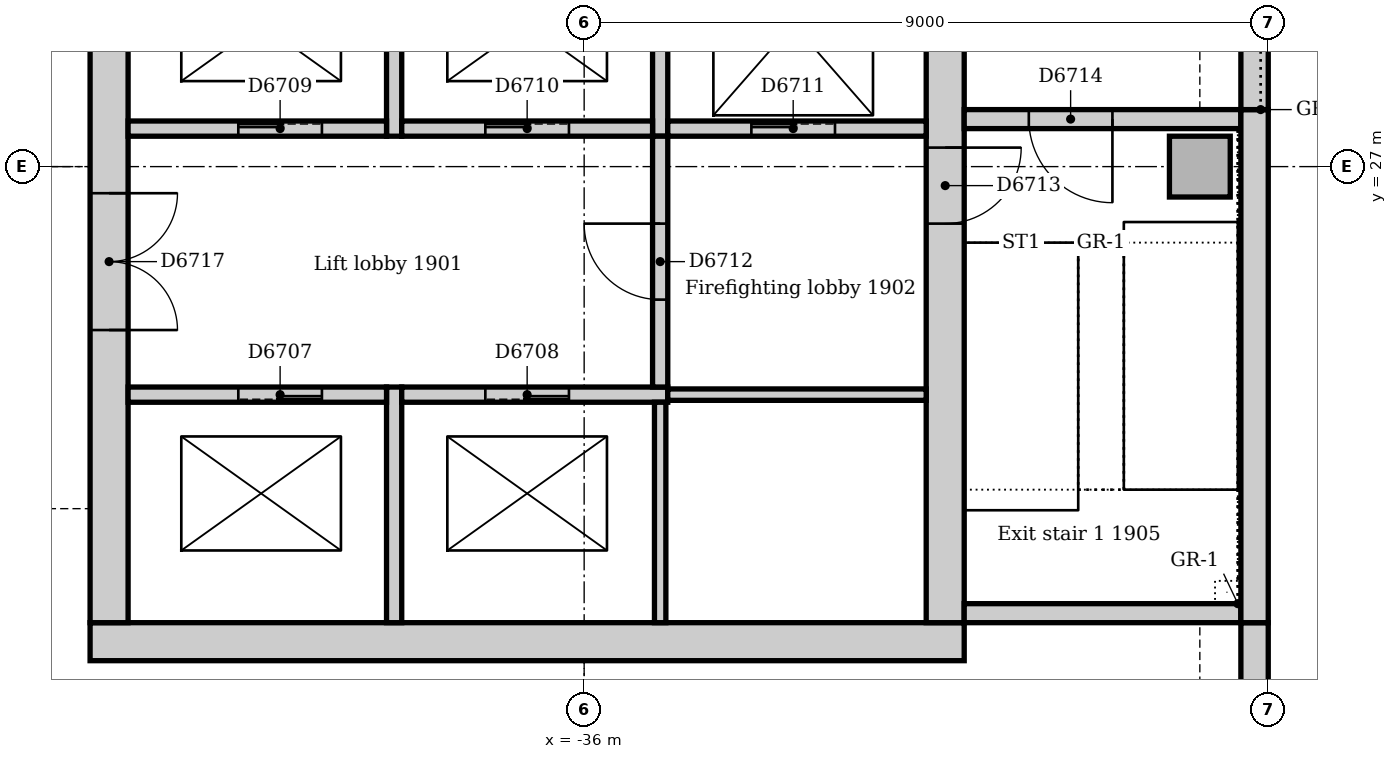
"""IFC4 building model, lengths in metres.
Left out: names, types, materials, properties, quantities, classifications, styles, units other than length and angle.
Written with IfcOpenShell. Run it as: python <this file> out.ifc"""

import sys

from ifc_helpers import new_model, si_unit, direction, frame, frame_2d, origin, origin_2d, place, context, subcontext, project, spatial, rectangle, extrude, element, fill, save


model = new_model("IFC4")
c1 = context("Model", 3, precision=1e-05, world=origin(), true_north=direction((0.0, 1.0)))
c2 = subcontext(c1, "Body", "Model", "MODEL_VIEW")
j1 = project(units=[si_unit("LENGTHUNIT", "METRE"), si_unit("PLANEANGLEUNIT", "RADIAN")], contexts=[c1])
p1 = place(None, origin())
s1 = spatial("IfcSite", under=j1, at=p1, CompositionType="ELEMENT")
p2 = place(p1, origin())
s2 = spatial("IfcBuilding", under=s1, at=p2, CompositionType="ELEMENT")
p3 = place(p2, frame((0.0, 0.0, 83.0)))
s3 = spatial("IfcBuildingStorey", under=s2, at=p3, CompositionType="ELEMENT", Elevation=83.0)
p4 = place(p3, frame((-42.5, 20.75, 0.0), z_axis=(0.0, 0.0, 1.0), x_axis=(1.0, 0.0, 0.0)))
e1 = element("IfcWall", 1, at=p4, inside=s3, PredefinedType="SOLIDWALL", context=c2, shape_type="SweptSolid", body=[
    extrude(rectangle(XDim=11.5, YDim=0.5, at=frame_2d((5.75, 0.0))), origin(), (0.0, 0.0, 1.0), 4.0),
])
p5 = place(p3, frame((-31.25, 21.0, 0.0), z_axis=(0.0, 0.0, 1.0), x_axis=(0.0, 1.0, 0.0)))
e2 = element("IfcWall", 2, at=p5, inside=s3, PredefinedType="SOLIDWALL", context=c2, shape_type="SweptSolid", body=[
    extrude(rectangle(XDim=9.5, YDim=0.5, at=frame_2d((4.75, 0.0))), origin(), (0.0, 0.0, 1.0), 4.0),
])
p6 = place(p5, frame((5.25, 0.0, 0.0)))
e3 = element("IfcOpeningElement", 3, at=p6, cuts=e2, PredefinedType="OPENING", context=c2, shape_type="SweptSolid", body=[
    extrude(rectangle(XDim=1.0, YDim=2.1, at=frame_2d((0.5, 1.05))), frame((0.0, 0.26, 0.0), z_axis=(0.0, -1.0, 0.0), x_axis=(1.0, 0.0, 0.0)), (0.0, 0.0, 1.0), 0.52),
])
p7 = place(p3, frame((-42.25, 30.5, 0.0), z_axis=(0.0, 0.0, 1.0), x_axis=(0.0, -1.0, 0.0)))
e4 = element("IfcWall", 4, at=p7, inside=s3, PredefinedType="SOLIDWALL", context=c2, shape_type="SweptSolid", body=[
    extrude(rectangle(XDim=9.5, YDim=0.5, at=frame_2d((4.75, 0.0))), origin(), (0.0, 0.0, 1.0), 4.0),
])
p8 = place(p7, frame((3.85, 0.0, 0.0)))
e5 = element("IfcOpeningElement", 5, at=p8, cuts=e4, PredefinedType="OPENING", context=c2, shape_type="SweptSolid", body=[
    extrude(rectangle(XDim=1.8, YDim=2.1, at=frame_2d((0.9, 1.05))), frame((0.0, 0.26, 0.0), z_axis=(0.0, -1.0, 0.0), x_axis=(1.0, 0.0, 0.0)), (0.0, 0.0, 1.0), 0.52),
])
p9 = place(p3, frame((-31.0, 21.125, 0.0), z_axis=(0.0, 0.0, 1.0), x_axis=(1.0, 0.0, 0.0)))
e6 = element("IfcWall", 6, at=p9, inside=s3, PredefinedType="SOLIDWALL", context=c2, shape_type="SweptSolid", body=[
    extrude(rectangle(XDim=3.64, YDim=0.25, at=frame_2d((1.82, 0.0))), origin(), (0.0, 0.0, 1.0), 4.0),
])
p10 = place(p3, frame((-27.36, 27.625, 0.0), z_axis=(0.0, 0.0, 1.0), x_axis=(-1.0, 0.0, 0.0)))
e7 = element("IfcWall", 7, at=p10, inside=s3, PredefinedType="SOLIDWALL", context=c2, shape_type="SweptSolid", body=[
    extrude(rectangle(XDim=3.64, YDim=0.25, at=frame_2d((1.82, 0.0))), origin(), (0.0, 0.0, 1.0), 4.0),
])
p11 = place(p10, frame((1.69, 0.0, 0.0)))
e8 = element("IfcOpeningElement", 8, at=p11, cuts=e7, PredefinedType="OPENING", context=c2, shape_type="SweptSolid", body=[
    extrude(rectangle(XDim=1.1, YDim=2.1, at=frame_2d((0.55, 1.05))), frame((0.0, 0.135, 0.0), z_axis=(0.0, -1.0, 0.0), x_axis=(1.0, 0.0, 0.0)), (0.0, 0.0, 1.0), 0.27),
])
p12 = place(p3, frame((-27.9, 27.0, 0.0), z_axis=(0.0, 0.0, 1.0), x_axis=(1.0, 0.0, 0.0)))
e9 = element("IfcColumn", 9, at=p12, inside=s3, PredefinedType="COLUMN", context=c2, shape_type="SweptSolid", body=[
    extrude(rectangle(XDim=0.8, YDim=0.8, at=origin_2d()), origin(), (0.0, 0.0, 1.0), 4.0),
])
p13 = place(p3, frame((-27.18, 13.243, 0.0), z_axis=(0.0, 0.0, 1.0), x_axis=(0.0, 1.0, 0.0)))
e10 = element("IfcWall", 10, at=p13, inside=s3, PredefinedType="STANDARD", context=c2, shape_type="SweptSolid", body=[
    extrude(rectangle(XDim=7.757, YDim=0.36, at=frame_2d((3.879, 0.0))), origin(), (0.0, 0.0, 1.0), 3.85),
])
p14 = place(p13, frame((1.982, 0.0, 0.9)))
e11 = element("IfcOpeningElement", 11, at=p14, cuts=e10, PredefinedType="OPENING", context=c2, shape_type="SweptSolid", body=[
    extrude(rectangle(XDim=3.3, YDim=1.6, at=frame_2d((1.65, 0.8))), frame((0.0, 0.19, 0.0), z_axis=(0.0, -1.0, 0.0), x_axis=(1.0, 0.0, 0.0)), (0.0, 0.0, 1.0), 0.38),
])
p15 = place(p3, frame((-27.18, 21.0, 0.0), z_axis=(0.0, 0.0, 1.0), x_axis=(0.0, 1.0, 0.0)))
e12 = element("IfcWall", 12, at=p15, inside=s3, PredefinedType="STANDARD", context=c2, shape_type="SweptSolid", body=[
    extrude(rectangle(XDim=6.75, YDim=0.36, at=frame_2d((3.375, 0.0))), origin(), (0.0, 0.0, 1.0), 3.85),
])
p16 = place(p3, frame((-27.18, 27.75, 0.0), z_axis=(0.0, 0.0, 1.0), x_axis=(0.0, 1.0, 0.0)))
e13 = element("IfcWall", 13, at=p16, inside=s3, PredefinedType="STANDARD", context=c2, shape_type="SweptSolid", body=[
    extrude(rectangle(XDim=7.5, YDim=0.36, at=frame_2d((3.75, 0.0))), origin(), (0.0, 0.0, 1.0), 3.85),
])
p17 = place(p16, frame((2.85, 0.0, 1.2)))
e14 = element("IfcOpeningElement", 14, at=p17, cuts=e13, PredefinedType="OPENING", context=c2, shape_type="SweptSolid", body=[
    extrude(rectangle(XDim=1.8, YDim=1.2, at=frame_2d((0.9, 0.6))), frame((0.0, 0.19, 0.0), z_axis=(0.0, -1.0, 0.0), x_axis=(1.0, 0.0, 0.0)), (0.0, 0.0, 1.0), 0.38),
])
p18 = place(p3, frame((-38.5, 21.0, 0.0), z_axis=(0.0, 0.0, 1.0), x_axis=(0.0, 1.0, 0.0)))
e15 = element("IfcWall", 15, at=p18, inside=s3, PredefinedType="SOLIDWALL", context=c2, shape_type="SweptSolid", body=[
    extrude(rectangle(XDim=3.1, YDim=0.2, at=frame_2d((1.55, 0.0))), origin(), (0.0, 0.0, 1.0), 4.0),
])
p19 = place(p3, frame((-38.6, 24.0, 0.0), z_axis=(0.0, 0.0, 1.0), x_axis=(-1.0, 0.0, 0.0)))
e16 = element("IfcWall", 16, at=p19, inside=s3, PredefinedType="SOLIDWALL", context=c2, shape_type="SweptSolid", body=[
    extrude(rectangle(XDim=3.4, YDim=0.2, at=frame_2d((1.7, 0.0))), origin(), (0.0, 0.0, 1.0), 4.0),
])
p20 = place(p19, frame((0.85, 0.0, 0.0)))
e17 = element("IfcOpeningElement", 17, at=p20, cuts=e16, PredefinedType="OPENING", context=c2, shape_type="SweptSolid", body=[
    extrude(rectangle(XDim=1.1, YDim=2.1, at=frame_2d((0.55, 1.05))), frame((0.0, 0.11, 0.0), z_axis=(0.0, -1.0, 0.0), x_axis=(1.0, 0.0, 0.0)), (0.0, 0.0, 1.0), 0.22),
])
p21 = place(p3, frame((-34.9, 24.0, 0.0), z_axis=(0.0, 0.0, 1.0), x_axis=(-1.0, 0.0, 0.0)))
e18 = element("IfcWall", 18, at=p21, inside=s3, PredefinedType="SOLIDWALL", context=c2, shape_type="SweptSolid", body=[
    extrude(rectangle(XDim=3.5, YDim=0.2, at=frame_2d((1.75, 0.0))), origin(), (0.0, 0.0, 1.0), 4.0),
])
p22 = place(p21, frame((1.3, 0.0, 0.0)))
e19 = element("IfcOpeningElement", 19, at=p22, cuts=e18, PredefinedType="OPENING", context=c2, shape_type="SweptSolid", body=[
    extrude(rectangle(XDim=1.1, YDim=2.1, at=frame_2d((0.55, 1.05))), frame((0.0, 0.11, 0.0), z_axis=(0.0, -1.0, 0.0), x_axis=(1.0, 0.0, 0.0)), (0.0, 0.0, 1.0), 0.22),
])
p23 = place(p3, frame((-38.5, 27.4, 0.0), z_axis=(0.0, 0.0, 1.0), x_axis=(0.0, 1.0, 0.0)))
e20 = element("IfcWall", 20, at=p23, inside=s3, PredefinedType="SOLIDWALL", context=c2, shape_type="SweptSolid", body=[
    extrude(rectangle(XDim=2.85, YDim=0.2, at=frame_2d((1.425, 0.0))), origin(), (0.0, 0.0, 1.0), 4.0),
])
p24 = place(p3, frame((-42.0, 27.5, 0.0), z_axis=(0.0, 0.0, 1.0), x_axis=(1.0, 0.0, 0.0)))
e21 = element("IfcWall", 21, at=p24, inside=s3, PredefinedType="SOLIDWALL", context=c2, shape_type="SweptSolid", body=[
    extrude(rectangle(XDim=3.4, YDim=0.2, at=frame_2d((1.7, 0.0))), origin(), (0.0, 0.0, 1.0), 4.0),
])
p25 = place(p24, frame((1.45, 0.0, 0.0)))
e22 = element("IfcOpeningElement", 22, at=p25, cuts=e21, PredefinedType="OPENING", context=c2, shape_type="SweptSolid", body=[
    extrude(rectangle(XDim=1.1, YDim=2.1, at=frame_2d((0.55, 1.05))), frame((0.0, 0.11, 0.0), z_axis=(0.0, -1.0, 0.0), x_axis=(1.0, 0.0, 0.0)), (0.0, 0.0, 1.0), 0.22),
])
p26 = place(p3, frame((-35.0, 27.4, 0.0), z_axis=(0.0, 0.0, 1.0), x_axis=(0.0, 1.0, 0.0)))
e23 = element("IfcWall", 23, at=p26, inside=s3, PredefinedType="SOLIDWALL", context=c2, shape_type="SweptSolid", body=[
    extrude(rectangle(XDim=2.85, YDim=0.2, at=frame_2d((1.425, 0.0))), origin(), (0.0, 0.0, 1.0), 4.0),
])
p27 = place(p3, frame((-38.4, 27.5, 0.0), z_axis=(0.0, 0.0, 1.0), x_axis=(1.0, 0.0, 0.0)))
e24 = element("IfcWall", 24, at=p27, inside=s3, PredefinedType="SOLIDWALL", context=c2, shape_type="SweptSolid", body=[
    extrude(rectangle(XDim=3.3, YDim=0.2, at=frame_2d((1.65, 0.0))), origin(), (0.0, 0.0, 1.0), 4.0),
])
p28 = place(p27, frame((1.1, 0.0, 0.0)))
e25 = element("IfcOpeningElement", 25, at=p28, cuts=e24, PredefinedType="OPENING", context=c2, shape_type="SweptSolid", body=[
    extrude(rectangle(XDim=1.1, YDim=2.1, at=frame_2d((0.55, 1.05))), frame((0.0, 0.11, 0.0), z_axis=(0.0, -1.0, 0.0), x_axis=(1.0, 0.0, 0.0)), (0.0, 0.0, 1.0), 0.22),
])
p29 = place(p3, frame((-34.9, 27.5, 0.0), z_axis=(0.0, 0.0, 1.0), x_axis=(1.0, 0.0, 0.0)))
e26 = element("IfcWall", 26, at=p29, inside=s3, PredefinedType="SOLIDWALL", context=c2, shape_type="SweptSolid", body=[
    extrude(rectangle(XDim=3.4, YDim=0.2, at=frame_2d((1.7, 0.0))), origin(), (0.0, 0.0, 1.0), 4.0),
])
p30 = place(p29, frame((1.1, 0.0, 0.0)))
e27 = element("IfcOpeningElement", 27, at=p30, cuts=e26, PredefinedType="OPENING", context=c2, shape_type="SweptSolid", body=[
    extrude(rectangle(XDim=1.1, YDim=2.1, at=frame_2d((0.55, 1.05))), frame((0.0, 0.11, 0.0), z_axis=(0.0, -1.0, 0.0), x_axis=(1.0, 0.0, 0.0)), (0.0, 0.0, 1.0), 0.22),
])
p31 = place(p3, frame((-35.0, 24.1, 0.0), z_axis=(0.0, 0.0, 1.0), x_axis=(0.0, 1.0, 0.0)))
e28 = element("IfcWall", 28, at=p31, inside=s3, PredefinedType="SOLIDWALL", context=c2, shape_type="SweptSolid", body=[
    extrude(rectangle(XDim=3.3, YDim=0.2, at=frame_2d((1.65, 0.0))), origin(), (0.0, 0.0, 1.0), 4.0),
])
p32 = place(p31, frame((1.15, 0.0, 0.0)))
e29 = element("IfcOpeningElement", 29, at=p32, cuts=e28, PredefinedType="OPENING", context=c2, shape_type="SweptSolid", body=[
    extrude(rectangle(XDim=1.0, YDim=2.1, at=frame_2d((0.5, 1.05))), frame((0.0, 0.11, 0.0), z_axis=(0.0, -1.0, 0.0), x_axis=(1.0, 0.0, 0.0)), (0.0, 0.0, 1.0), 0.22),
])
p33 = place(p3, frame((-35.0, 21.0, 0.0), z_axis=(0.0, 0.0, 1.0), x_axis=(0.0, 1.0, 0.0)))
e30 = element("IfcWall", 30, at=p33, inside=s3, PredefinedType="SOLIDWALL", context=c2, shape_type="SweptSolid", body=[
    extrude(rectangle(XDim=2.9, YDim=0.15, at=frame_2d((1.45, 0.0))), origin(), (0.0, 0.0, 1.0), 4.0),
])
p34 = place(p3, frame((-31.5, 24.0, 0.0), z_axis=(0.0, 0.0, 1.0), x_axis=(-1.0, 0.0, 0.0)))
e31 = element("IfcWall", 31, at=p34, inside=s3, PredefinedType="SOLIDWALL", context=c2, shape_type="SweptSolid", body=[
    extrude(rectangle(XDim=3.4, YDim=0.15, at=frame_2d((1.7, 0.0))), origin(), (0.0, 0.0, 1.0), 4.0),
])
p35 = place(p20, origin())
e32 = element("IfcDoor", 32, at=p35, inside=s3, OperationType="SLIDING_TO_LEFT", PredefinedType="DOOR", context=c2, shape_type="SweptSolid", body=[
    extrude(rectangle(XDim=1.1, YDim=2.1, at=frame_2d((0.55, 1.05))), frame((0.0, 0.025, 0.0), z_axis=(0.0, -1.0, 0.0), x_axis=(1.0, 0.0, 0.0)), (0.0, 0.0, 1.0), 0.05),
])
fill(e17, e32)
p36 = place(p22, origin())
e33 = element("IfcDoor", 33, at=p36, inside=s3, OperationType="SLIDING_TO_LEFT", PredefinedType="DOOR", context=c2, shape_type="SweptSolid", body=[
    extrude(rectangle(XDim=1.1, YDim=2.1, at=frame_2d((0.55, 1.05))), frame((0.0, 0.025, 0.0), z_axis=(0.0, -1.0, 0.0), x_axis=(1.0, 0.0, 0.0)), (0.0, 0.0, 1.0), 0.05),
])
fill(e19, e33)
p37 = place(p25, origin())
e34 = element("IfcDoor", 34, at=p37, inside=s3, OperationType="SLIDING_TO_LEFT", PredefinedType="DOOR", context=c2, shape_type="SweptSolid", body=[
    extrude(rectangle(XDim=1.1, YDim=2.1, at=frame_2d((0.55, 1.05))), frame((0.0, 0.025, 0.0), z_axis=(0.0, -1.0, 0.0), x_axis=(1.0, 0.0, 0.0)), (0.0, 0.0, 1.0), 0.05),
])
fill(e22, e34)
p38 = place(p28, origin())
e35 = element("IfcDoor", 35, at=p38, inside=s3, OperationType="SLIDING_TO_LEFT", PredefinedType="DOOR", context=c2, shape_type="SweptSolid", body=[
    extrude(rectangle(XDim=1.1, YDim=2.1, at=frame_2d((0.55, 1.05))), frame((0.0, 0.025, 0.0), z_axis=(0.0, -1.0, 0.0), x_axis=(1.0, 0.0, 0.0)), (0.0, 0.0, 1.0), 0.05),
])
fill(e25, e35)
p39 = place(p30, origin())
e36 = element("IfcDoor", 36, at=p39, inside=s3, OperationType="SLIDING_TO_LEFT", PredefinedType="DOOR", context=c2, shape_type="SweptSolid", body=[
    extrude(rectangle(XDim=1.1, YDim=2.1, at=frame_2d((0.55, 1.05))), frame((0.0, 0.025, 0.0), z_axis=(0.0, -1.0, 0.0), x_axis=(1.0, 0.0, 0.0)), (0.0, 0.0, 1.0), 0.05),
])
fill(e27, e36)
p40 = place(p32, origin())
e37 = element("IfcDoor", 37, at=p40, inside=s3, OperationType="SINGLE_SWING_RIGHT", PredefinedType="DOOR", context=c2, shape_type="SweptSolid", body=[
    extrude(rectangle(XDim=1.0, YDim=2.1, at=frame_2d((0.5, 1.05))), frame((0.0, 0.025, 0.0), z_axis=(0.0, -1.0, 0.0), x_axis=(1.0, 0.0, 0.0)), (0.0, 0.0, 1.0), 0.05),
])
fill(e29, e37)
p41 = place(p6, frame((1.0, 0.0, 0.0), z_axis=(0.0, 0.0, 1.0), x_axis=(-1.0, 0.0, 0.0)))
e38 = element("IfcDoor", 38, at=p41, inside=s3, OperationType="SINGLE_SWING_LEFT", PredefinedType="DOOR", context=c2, shape_type="SweptSolid", body=[
    extrude(rectangle(XDim=1.0, YDim=2.1, at=frame_2d((0.5, 1.05))), frame((0.0, 0.025, 0.0), z_axis=(0.0, -1.0, 0.0), x_axis=(1.0, 0.0, 0.0)), (0.0, 0.0, 1.0), 0.05),
])
fill(e3, e38)
p42 = place(p11, origin())
e39 = element("IfcDoor", 39, at=p42, inside=s3, OperationType="SINGLE_SWING_LEFT", PredefinedType="DOOR", context=c2, shape_type="SweptSolid", body=[
    extrude(rectangle(XDim=1.1, YDim=2.1, at=frame_2d((0.55, 1.05))), frame((0.0, 0.025, 0.0), z_axis=(0.0, -1.0, 0.0), x_axis=(1.0, 0.0, 0.0)), (0.0, 0.0, 1.0), 0.05),
])
fill(e8, e39)
p43 = place(p8, origin())
e40 = element("IfcDoor", 40, at=p43, inside=s3, OperationType="DOUBLE_DOOR_SINGLE_SWING", PredefinedType="DOOR", context=c2, shape_type="SweptSolid", body=[
    extrude(rectangle(XDim=1.8, YDim=2.1, at=frame_2d((0.9, 1.05))), frame((0.0, 0.025, 0.0), z_axis=(0.0, -1.0, 0.0), x_axis=(1.0, 0.0, 0.0)), (0.0, 0.0, 1.0), 0.05),
])
fill(e5, e40)
save(model, sys.argv[1])
